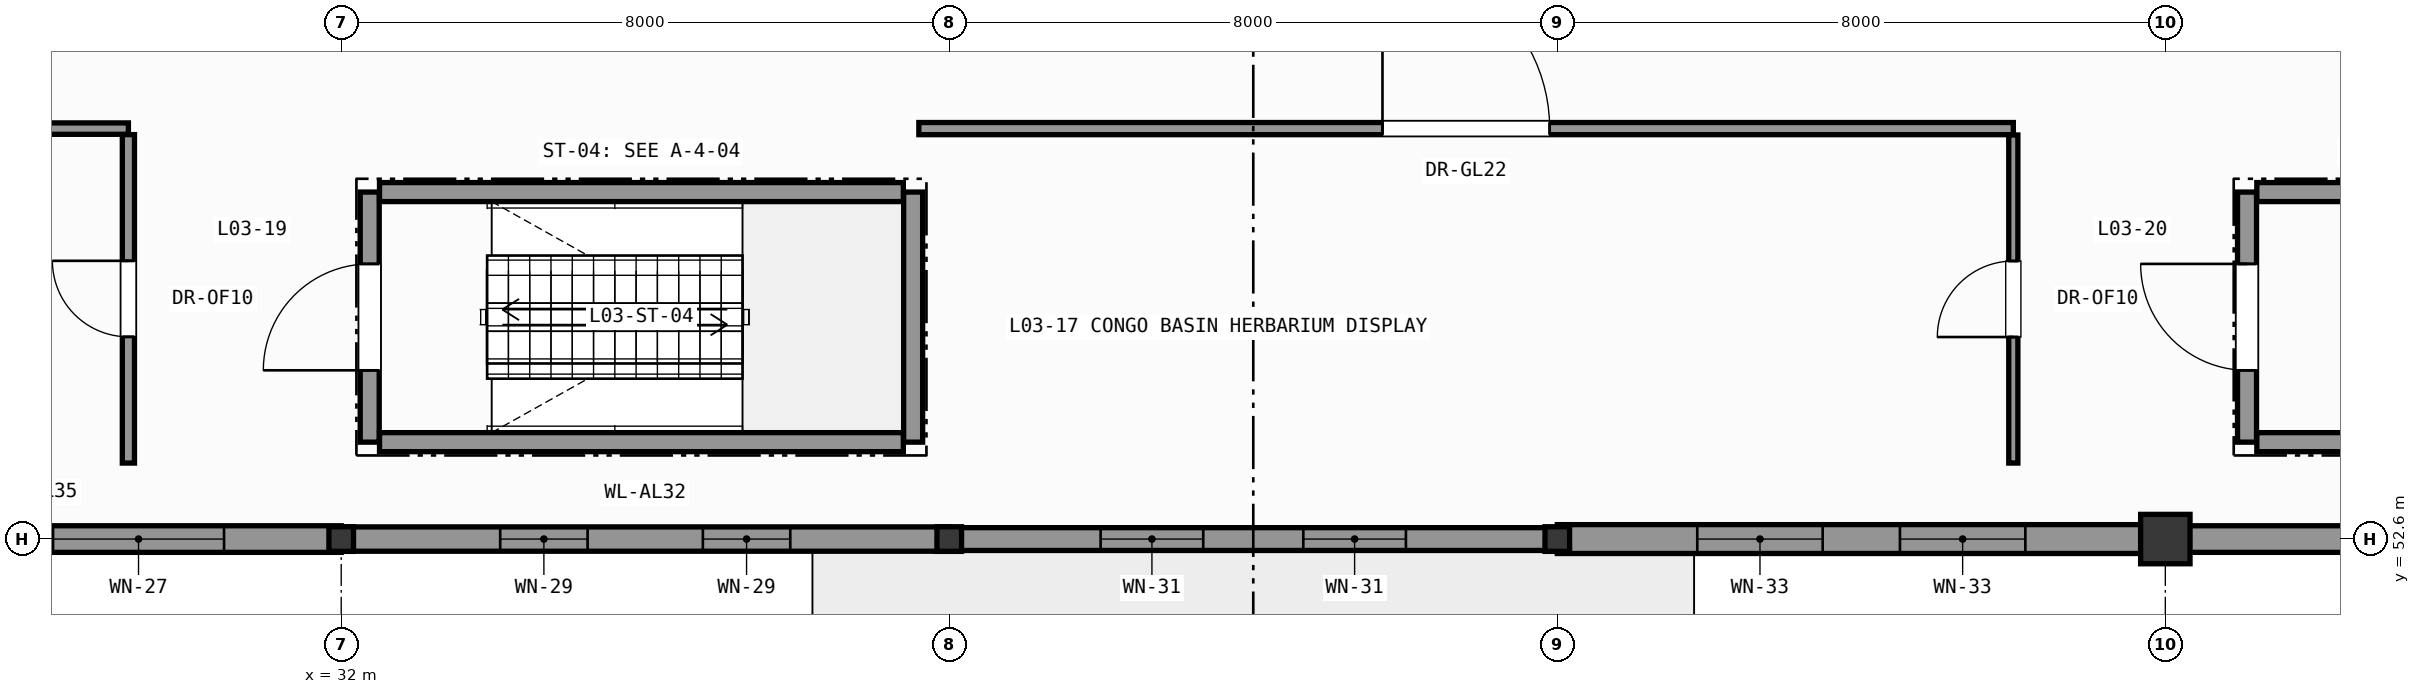
"""IFC4 building model, lengths in metres.
Left out: names, types, materials, properties, quantities, classifications, styles, units other than length and angle.
Written with IfcOpenShell. Run it as: python <this file> out.ifc"""

import sys

from ifc_helpers import new_model, si_unit, direction, frame, frame_2d, origin, origin_2d, place, context, subcontext, project, spatial, rectangle, hollow_circle, extrude, element, fill, save


model = new_model("IFC4")
c1 = context("Model", 3, precision=1e-05, world=origin(), true_north=direction((0.0, 1.0)))
c2 = subcontext(c1, "Body", "Model", "MODEL_VIEW")
j1 = project(units=[si_unit("LENGTHUNIT", "METRE"), si_unit("PLANEANGLEUNIT", "RADIAN")], contexts=[c1])
p1 = place(None, origin())
s1 = spatial("IfcSite", under=j1, at=p1, CompositionType="ELEMENT")
p2 = place(p1, origin())
s2 = spatial("IfcBuilding", under=s1, at=p2, CompositionType="ELEMENT")
p3 = place(p2, frame((0.0, 0.0, 13.2)))
s3 = spatial("IfcBuildingStorey", under=s2, at=p3, CompositionType="ELEMENT", Elevation=13.2)
for number, where, z_axis, x_axis in (
    (1, (32.0, 52.6, 0.0), (0.0, 0.0, 1.0), (1.0, 0.0, 0.0)),
    (2, (40.0, 52.6, 0.0), (0.0, 0.0, 1.0), (1.0, 0.0, 0.0)),
    (3, (48.0, 52.6, 0.0), (0.0, 0.0, 1.0), (1.0, 0.0, 0.0)),
):
    element("IfcColumn", number, at=place(p3, frame(where, z_axis=z_axis, x_axis=x_axis)), inside=s3, PredefinedType="COLUMN", context=c2, shape_type="SweptSolid", body=[
        extrude(hollow_circle(Radius=0.162, WallThickness=0.016, at=origin_2d()), origin(), (0.0, 0.0, 1.0), 4.8),
    ])
p4 = place(p3, frame((56.0, 52.6, 0.0), z_axis=(0.0, 0.0, 1.0), x_axis=(1.0, 0.0, 0.0)))
e4 = element("IfcColumn", 4, at=p4, inside=s3, PredefinedType="PILASTER", context=c2, shape_type="SweptSolid", body=[
    extrude(rectangle(XDim=0.65, YDim=0.65, at=origin_2d()), origin(), (0.0, 0.0, 1.0), 4.8),
])
p5 = place(p3, frame((32.0, 52.6, 0.0), z_axis=(0.0, 0.0, 1.0), x_axis=(-1.0, 0.0, 0.0)))
e5 = element("IfcWall", 5, at=p5, inside=s3, PredefinedType="SOLIDWALL", context=c2, shape_type="SweptSolid", body=[
    extrude(rectangle(XDim=8.0, YDim=0.35, at=frame_2d((4.0, 0.0))), origin(), (0.0, 0.0, 1.0), 4.315),
])
p6 = place(p5, frame((1.542, 0.0, 0.95)))
e6 = element("IfcOpeningElement", 6, at=p6, cuts=e5, PredefinedType="OPENING", context=c2, shape_type="SweptSolid", body=[
    extrude(rectangle(XDim=2.25, YDim=2.95, at=frame_2d((1.125, 1.475))), frame((0.0, 0.185, 0.0), z_axis=(0.0, -1.0, 0.0), x_axis=(1.0, 0.0, 0.0)), (0.0, 0.0, 1.0), 0.37),
])
p7 = place(p5, frame((4.208, 0.0, 0.95)))
e7 = element("IfcOpeningElement", 7, at=p7, cuts=e5, PredefinedType="OPENING", context=c2, shape_type="SweptSolid", body=[
    extrude(rectangle(XDim=2.25, YDim=2.95, at=frame_2d((1.125, 1.475))), frame((0.0, 0.185, 0.0), z_axis=(0.0, -1.0, 0.0), x_axis=(1.0, 0.0, 0.0)), (0.0, 0.0, 1.0), 0.37),
])
p8 = place(p3, frame((40.0, 52.6, 0.0), z_axis=(0.0, 0.0, 1.0), x_axis=(-1.0, 0.0, 0.0)))
e8 = element("IfcWall", 8, at=p8, inside=s3, PredefinedType="SOLIDWALL", context=c2, shape_type="SweptSolid", body=[
    extrude(rectangle(XDim=8.0, YDim=0.32, at=frame_2d((4.0, 0.0))), origin(), (0.0, 0.0, 1.0), 4.245),
])
p9 = place(p8, frame((2.092, 0.0, 0.95)))
e9 = element("IfcOpeningElement", 9, at=p9, cuts=e8, PredefinedType="OPENING", context=c2, shape_type="SweptSolid", body=[
    extrude(rectangle(XDim=1.15, YDim=1.9, at=frame_2d((0.575, 0.95))), frame((0.0, 0.17, 0.0), z_axis=(0.0, -1.0, 0.0), x_axis=(1.0, 0.0, 0.0)), (0.0, 0.0, 1.0), 0.34),
])
p10 = place(p8, frame((4.758, 0.0, 0.95)))
e10 = element("IfcOpeningElement", 10, at=p10, cuts=e8, PredefinedType="OPENING", context=c2, shape_type="SweptSolid", body=[
    extrude(rectangle(XDim=1.15, YDim=1.9, at=frame_2d((0.575, 0.95))), frame((0.0, 0.17, 0.0), z_axis=(0.0, -1.0, 0.0), x_axis=(1.0, 0.0, 0.0)), (0.0, 0.0, 1.0), 0.34),
])
p11 = place(p3, frame((48.0, 52.6, 0.0), z_axis=(0.0, 0.0, 1.0), x_axis=(-1.0, 0.0, 0.0)))
e11 = element("IfcWall", 11, at=p11, inside=s3, PredefinedType="SOLIDWALL", context=c2, shape_type="SweptSolid", body=[
    extrude(rectangle(XDim=8.0, YDim=0.3, at=frame_2d((4.0, 0.0))), origin(), (0.0, 0.0, 1.0), 4.185),
])
p12 = place(p11, frame((1.992, 0.0, 0.95)))
e12 = element("IfcOpeningElement", 12, at=p12, cuts=e11, PredefinedType="OPENING", context=c2, shape_type="SweptSolid", body=[
    extrude(rectangle(XDim=1.35, YDim=2.45, at=frame_2d((0.675, 1.225))), frame((0.0, 0.16, 0.0), z_axis=(0.0, -1.0, 0.0), x_axis=(1.0, 0.0, 0.0)), (0.0, 0.0, 1.0), 0.32),
])
p13 = place(p11, frame((4.658, 0.0, 0.95)))
e13 = element("IfcOpeningElement", 13, at=p13, cuts=e11, PredefinedType="OPENING", context=c2, shape_type="SweptSolid", body=[
    extrude(rectangle(XDim=1.35, YDim=2.45, at=frame_2d((0.675, 1.225))), frame((0.0, 0.16, 0.0), z_axis=(0.0, -1.0, 0.0), x_axis=(1.0, 0.0, 0.0)), (0.0, 0.0, 1.0), 0.32),
])
p14 = place(p3, frame((56.0, 52.6, 0.0), z_axis=(0.0, 0.0, 1.0), x_axis=(-1.0, 0.0, 0.0)))
e14 = element("IfcWall", 14, at=p14, inside=s3, PredefinedType="SOLIDWALL", context=c2, shape_type="SweptSolid", body=[
    extrude(rectangle(XDim=8.0, YDim=0.38, at=frame_2d((4.0, 0.0))), origin(), (0.0, 0.0, 1.0), 4.095),
])
p15 = place(p14, frame((1.842, 0.0, 0.95)))
e15 = element("IfcOpeningElement", 15, at=p15, cuts=e14, PredefinedType="OPENING", context=c2, shape_type="SweptSolid", body=[
    extrude(rectangle(XDim=1.65, YDim=2.75, at=frame_2d((0.825, 1.375))), frame((0.0, 0.2, 0.0), z_axis=(0.0, -1.0, 0.0), x_axis=(1.0, 0.0, 0.0)), (0.0, 0.0, 1.0), 0.4),
])
p16 = place(p14, frame((4.508, 0.0, 0.95)))
e16 = element("IfcOpeningElement", 16, at=p16, cuts=e14, PredefinedType="OPENING", context=c2, shape_type="SweptSolid", body=[
    extrude(rectangle(XDim=1.65, YDim=2.75, at=frame_2d((0.825, 1.375))), frame((0.0, 0.2, 0.0), z_axis=(0.0, -1.0, 0.0), x_axis=(1.0, 0.0, 0.0)), (0.0, 0.0, 1.0), 0.4),
])
p17 = place(p3, frame((70.0, 52.6, 0.0), z_axis=(0.0, 0.0, 1.0), x_axis=(-1.0, 0.0, 0.0)))
e17 = element("IfcWall", 17, at=p17, inside=s3, PredefinedType="SOLIDWALL", context=c2, shape_type="SweptSolid", body=[
    extrude(rectangle(XDim=14.0, YDim=0.35, at=frame_2d((7.0, 0.0))), origin(), (0.0, 0.0, 1.0), 3.995),
])
p18 = place(p17, frame((3.642, 0.0, 0.95)))
e18 = element("IfcOpeningElement", 18, at=p18, cuts=e17, PredefinedType="OPENING", context=c2, shape_type="SweptSolid", body=[
    extrude(rectangle(XDim=2.05, YDim=2.65, at=frame_2d((1.025, 1.325))), frame((0.0, 0.185, 0.0), z_axis=(0.0, -1.0, 0.0), x_axis=(1.0, 0.0, 0.0)), (0.0, 0.0, 1.0), 0.37),
])
p19 = place(p17, frame((8.308, 0.0, 0.95)))
e19 = element("IfcOpeningElement", 19, at=p19, cuts=e17, PredefinedType="OPENING", context=c2, shape_type="SweptSolid", body=[
    extrude(rectangle(XDim=2.05, YDim=2.65, at=frame_2d((1.025, 1.325))), frame((0.0, 0.185, 0.0), z_axis=(0.0, -1.0, 0.0), x_axis=(1.0, 0.0, 0.0)), (0.0, 0.0, 1.0), 0.37),
])
p20 = place(p3, frame((57.075, 53.875, 0.0), z_axis=(0.0, 0.0, 1.0), x_axis=(0.0, 1.0, 0.0)))
e20 = element("IfcWall", 20, at=p20, inside=s3, PredefinedType="SHEAR", context=c2, shape_type="SweptSolid", body=[
    extrude(rectangle(XDim=3.29, YDim=0.25, at=frame_2d((1.645, 0.0))), origin(), (0.0, 0.0, 1.0), 4.56),
])
p21 = place(p20, frame((0.945, 0.0, 0.0)))
e21 = element("IfcOpeningElement", 21, at=p21, cuts=e20, PredefinedType="OPENING", context=c2, shape_type="SweptSolid", body=[
    extrude(rectangle(XDim=1.4, YDim=2.2, at=frame_2d((0.7, 1.1))), frame((0.0, 0.135, 0.0), z_axis=(0.0, -1.0, 0.0), x_axis=(1.0, 0.0, 0.0)), (0.0, 0.0, 1.0), 0.27),
])
for number, where, z_axis, x_axis in (
    (22, (57.204, 53.875, 0.0), (0.0, 0.0, 1.0), (1.0, 0.0, 0.0)),
    (23, (57.204, 57.165, 0.0), (0.0, 0.0, 1.0), (1.0, 0.0, 0.0)),
):
    element("IfcWall", number, at=place(p3, frame(where, z_axis=z_axis, x_axis=x_axis)), inside=s3, PredefinedType="SHEAR", context=c2, shape_type="SweptSolid", body=[
        extrude(rectangle(XDim=7.192, YDim=0.25, at=frame_2d((3.596, 0.0))), origin(), (0.0, 0.0, 1.0), 4.56),
    ])
p22 = place(p3, frame((32.375, 53.875, 0.0), z_axis=(0.0, 0.0, 1.0), x_axis=(0.0, 1.0, 0.0)))
e24 = element("IfcWall", 24, at=p22, inside=s3, PredefinedType="SHEAR", context=c2, shape_type="SweptSolid", body=[
    extrude(rectangle(XDim=3.29, YDim=0.25, at=frame_2d((1.645, 0.0))), origin(), (0.0, 0.0, 1.0), 4.56),
])
p23 = place(p22, frame((0.945, 0.0, 0.0)))
e25 = element("IfcOpeningElement", 25, at=p23, cuts=e24, PredefinedType="OPENING", context=c2, shape_type="SweptSolid", body=[
    extrude(rectangle(XDim=1.4, YDim=2.2, at=frame_2d((0.7, 1.1))), frame((0.0, 0.135, 0.0), z_axis=(0.0, -1.0, 0.0), x_axis=(1.0, 0.0, 0.0)), (0.0, 0.0, 1.0), 0.27),
])
p24 = place(p3, frame((39.525, 53.875, 0.0), z_axis=(0.0, 0.0, 1.0), x_axis=(0.0, 1.0, 0.0)))
e26 = element("IfcWall", 26, at=p24, inside=s3, PredefinedType="SHEAR", context=c2, shape_type="SweptSolid", body=[
    extrude(rectangle(XDim=3.29, YDim=0.25, at=frame_2d((1.645, 0.0))), origin(), (0.0, 0.0, 1.0), 4.56),
])
for number, where, z_axis, x_axis in (
    (27, (32.504, 53.875, 0.0), (0.0, 0.0, 1.0), (1.0, 0.0, 0.0)),
    (28, (32.504, 57.165, 0.0), (0.0, 0.0, 1.0), (1.0, 0.0, 0.0)),
):
    element("IfcWall", number, at=place(p3, frame(where, z_axis=z_axis, x_axis=x_axis)), inside=s3, PredefinedType="SHEAR", context=c2, shape_type="SweptSolid", body=[
        extrude(rectangle(XDim=6.892, YDim=0.25, at=frame_2d((3.446, 0.0))), origin(), (0.0, 0.0, 1.0), 4.56),
    ])
p25 = place(p3, frame((39.6, 58.0, 0.0), z_axis=(0.0, 0.0, 1.0), x_axis=(1.0, 0.0, 0.0)))
e29 = element("IfcWall", 29, at=p25, inside=s3, PredefinedType="PARTITIONING", context=c2, shape_type="SweptSolid", body=[
    extrude(rectangle(XDim=14.4, YDim=0.16, at=frame_2d((7.2, 0.0))), origin(), (0.0, 0.0, 1.0), 4.56),
])
p26 = place(p25, frame((6.1, 0.0, 0.0)))
e30 = element("IfcOpeningElement", 30, at=p26, cuts=e29, PredefinedType="OPENING", context=c2, shape_type="SweptSolid", body=[
    extrude(rectangle(XDim=2.2, YDim=2.6, at=frame_2d((1.1, 1.3))), frame((0.0, 0.09, 0.0), z_axis=(0.0, -1.0, 0.0), x_axis=(1.0, 0.0, 0.0)), (0.0, 0.0, 1.0), 0.18),
])
p27 = place(p3, frame((9.764, 58.0, 0.0), z_axis=(0.0, 0.0, 1.0), x_axis=(1.0, 0.0, 0.0)))
e31 = element("IfcWall", 31, at=p27, inside=s3, PredefinedType="PARTITIONING", context=c2, shape_type="SweptSolid", body=[
    extrude(rectangle(XDim=19.436, YDim=0.15, at=frame_2d((9.718, 0.0))), origin(), (0.0, 0.0, 1.0), 4.56),
])
p28 = place(p27, frame((8.618, 0.0, 0.0)))
e32 = element("IfcOpeningElement", 32, at=p28, cuts=e31, PredefinedType="OPENING", context=c2, shape_type="SweptSolid", body=[
    extrude(rectangle(XDim=2.2, YDim=2.6, at=frame_2d((1.1, 1.3))), frame((0.0, 0.085, 0.0), z_axis=(0.0, -1.0, 0.0), x_axis=(1.0, 0.0, 0.0)), (0.0, 0.0, 1.0), 0.17),
])
p29 = place(p3, frame((54.0, 53.6, 0.0), z_axis=(0.0, 0.0, 1.0), x_axis=(0.0, 1.0, 0.0)))
e33 = element("IfcWall", 33, at=p29, inside=s3, PredefinedType="PARTITIONING", context=c2, shape_type="SweptSolid", body=[
    extrude(rectangle(XDim=4.316, YDim=0.12, at=frame_2d((2.158, 0.0))), origin(), (0.0, 0.0, 1.0), 4.56),
])
p30 = place(p29, frame((1.658, 0.0, 0.0)))
e34 = element("IfcOpeningElement", 34, at=p30, cuts=e33, PredefinedType="OPENING", context=c2, shape_type="SweptSolid", body=[
    extrude(rectangle(XDim=1.0, YDim=2.15, at=frame_2d((0.5, 1.075))), frame((0.0, 0.07, 0.0), z_axis=(0.0, -1.0, 0.0), x_axis=(1.0, 0.0, 0.0)), (0.0, 0.0, 1.0), 0.14),
])
p31 = place(p3, frame((29.2, 53.6, 0.0), z_axis=(0.0, 0.0, 1.0), x_axis=(0.0, 1.0, 0.0)))
e35 = element("IfcWall", 35, at=p31, inside=s3, PredefinedType="PARTITIONING", context=c2, shape_type="SweptSolid", body=[
    extrude(rectangle(XDim=4.321, YDim=0.16, at=frame_2d((2.16, 0.0))), origin(), (0.0, 0.0, 1.0), 4.56),
])
p32 = place(p31, frame((1.66, 0.0, 0.0)))
e36 = element("IfcOpeningElement", 36, at=p32, cuts=e35, PredefinedType="OPENING", context=c2, shape_type="SweptSolid", body=[
    extrude(rectangle(XDim=1.0, YDim=2.15, at=frame_2d((0.5, 1.075))), frame((0.0, 0.09, 0.0), z_axis=(0.0, -1.0, 0.0), x_axis=(1.0, 0.0, 0.0)), (0.0, 0.0, 1.0), 0.18),
])
p33 = place(p6, origin())
e37 = element("IfcWindow", 37, at=p33, inside=s3, PartitioningType="SINGLE_PANEL", PredefinedType="WINDOW", context=c2, shape_type="SweptSolid", body=[
    extrude(rectangle(XDim=2.25, YDim=2.95, at=frame_2d((1.125, 1.475))), frame((0.0, 0.03, 0.0), z_axis=(0.0, -1.0, 0.0), x_axis=(1.0, 0.0, 0.0)), (0.0, 0.0, 1.0), 0.06),
])
fill(e6, e37)
p34 = place(p9, origin())
e38 = element("IfcWindow", 38, at=p34, inside=s3, PartitioningType="SINGLE_PANEL", PredefinedType="WINDOW", context=c2, shape_type="SweptSolid", body=[
    extrude(rectangle(XDim=1.15, YDim=1.9, at=frame_2d((0.575, 0.95))), frame((0.0, 0.03, 0.0), z_axis=(0.0, -1.0, 0.0), x_axis=(1.0, 0.0, 0.0)), (0.0, 0.0, 1.0), 0.06),
])
fill(e9, e38)
p35 = place(p10, origin())
e39 = element("IfcWindow", 39, at=p35, inside=s3, PartitioningType="SINGLE_PANEL", PredefinedType="WINDOW", context=c2, shape_type="SweptSolid", body=[
    extrude(rectangle(XDim=1.15, YDim=1.9, at=frame_2d((0.575, 0.95))), frame((0.0, 0.03, 0.0), z_axis=(0.0, -1.0, 0.0), x_axis=(1.0, 0.0, 0.0)), (0.0, 0.0, 1.0), 0.06),
])
fill(e10, e39)
p36 = place(p12, origin())
e40 = element("IfcWindow", 40, at=p36, inside=s3, PartitioningType="SINGLE_PANEL", PredefinedType="WINDOW", context=c2, shape_type="SweptSolid", body=[
    extrude(rectangle(XDim=1.35, YDim=2.45, at=frame_2d((0.675, 1.225))), frame((0.0, 0.03, 0.0), z_axis=(0.0, -1.0, 0.0), x_axis=(1.0, 0.0, 0.0)), (0.0, 0.0, 1.0), 0.06),
])
fill(e12, e40)
p37 = place(p13, origin())
e41 = element("IfcWindow", 41, at=p37, inside=s3, PartitioningType="SINGLE_PANEL", PredefinedType="WINDOW", context=c2, shape_type="SweptSolid", body=[
    extrude(rectangle(XDim=1.35, YDim=2.45, at=frame_2d((0.675, 1.225))), frame((0.0, 0.03, 0.0), z_axis=(0.0, -1.0, 0.0), x_axis=(1.0, 0.0, 0.0)), (0.0, 0.0, 1.0), 0.06),
])
fill(e13, e41)
p38 = place(p15, origin())
e42 = element("IfcWindow", 42, at=p38, inside=s3, PartitioningType="SINGLE_PANEL", PredefinedType="WINDOW", context=c2, shape_type="SweptSolid", body=[
    extrude(rectangle(XDim=1.65, YDim=2.75, at=frame_2d((0.825, 1.375))), frame((0.0, 0.03, 0.0), z_axis=(0.0, -1.0, 0.0), x_axis=(1.0, 0.0, 0.0)), (0.0, 0.0, 1.0), 0.06),
])
fill(e15, e42)
p39 = place(p16, origin())
e43 = element("IfcWindow", 43, at=p39, inside=s3, PartitioningType="SINGLE_PANEL", PredefinedType="WINDOW", context=c2, shape_type="SweptSolid", body=[
    extrude(rectangle(XDim=1.65, YDim=2.75, at=frame_2d((0.825, 1.375))), frame((0.0, 0.03, 0.0), z_axis=(0.0, -1.0, 0.0), x_axis=(1.0, 0.0, 0.0)), (0.0, 0.0, 1.0), 0.06),
])
fill(e16, e43)
p40 = place(p21, origin())
e44 = element("IfcDoor", 44, at=p40, inside=s3, OperationType="SINGLE_SWING_RIGHT", PredefinedType="DOOR", context=c2, shape_type="SweptSolid", body=[
    extrude(rectangle(XDim=1.4, YDim=2.2, at=frame_2d((0.7, 1.1))), frame((0.0, 0.025, 0.0), z_axis=(0.0, -1.0, 0.0), x_axis=(1.0, 0.0, 0.0)), (0.0, 0.0, 1.0), 0.05),
])
fill(e21, e44)
p41 = place(p23, origin())
e45 = element("IfcDoor", 45, at=p41, inside=s3, OperationType="SINGLE_SWING_LEFT", PredefinedType="DOOR", context=c2, shape_type="SweptSolid", body=[
    extrude(rectangle(XDim=1.4, YDim=2.2, at=frame_2d((0.7, 1.1))), frame((0.0, 0.025, 0.0), z_axis=(0.0, -1.0, 0.0), x_axis=(1.0, 0.0, 0.0)), (0.0, 0.0, 1.0), 0.05),
])
fill(e25, e45)
p42 = place(p26, origin())
e46 = element("IfcDoor", 46, at=p42, inside=s3, OperationType="SINGLE_SWING_LEFT", PredefinedType="DOOR", context=c2, shape_type="SweptSolid", body=[
    extrude(rectangle(XDim=2.2, YDim=2.6, at=frame_2d((1.1, 1.3))), frame((0.0, 0.025, 0.0), z_axis=(0.0, -1.0, 0.0), x_axis=(1.0, 0.0, 0.0)), (0.0, 0.0, 1.0), 0.05),
])
fill(e30, e46)
p43 = place(p30, origin())
e47 = element("IfcDoor", 47, at=p43, inside=s3, OperationType="SINGLE_SWING_LEFT", PredefinedType="DOOR", context=c2, shape_type="SweptSolid", body=[
    extrude(rectangle(XDim=1.0, YDim=2.15, at=frame_2d((0.5, 1.075))), frame((0.0, 0.025, 0.0), z_axis=(0.0, -1.0, 0.0), x_axis=(1.0, 0.0, 0.0)), (0.0, 0.0, 1.0), 0.05),
])
fill(e34, e47)
p44 = place(p32, origin())
e48 = element("IfcDoor", 48, at=p44, inside=s3, OperationType="SINGLE_SWING_RIGHT", PredefinedType="DOOR", context=c2, shape_type="SweptSolid", body=[
    extrude(rectangle(XDim=1.0, YDim=2.15, at=frame_2d((0.5, 1.075))), frame((0.0, 0.025, 0.0), z_axis=(0.0, -1.0, 0.0), x_axis=(1.0, 0.0, 0.0)), (0.0, 0.0, 1.0), 0.05),
])
fill(e36, e48)
save(model, sys.argv[1])
